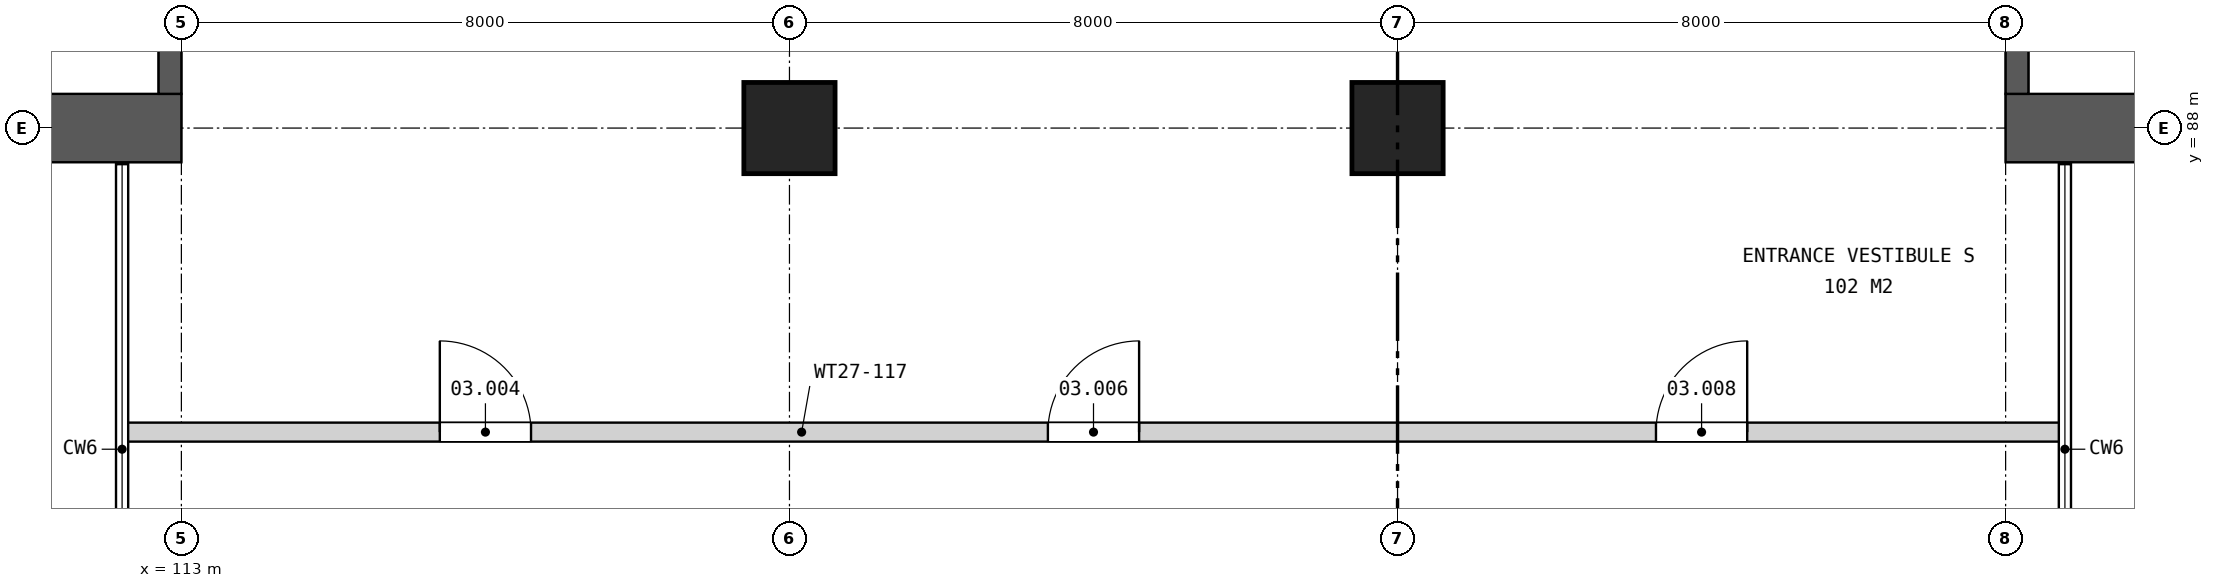
"""IFC4 building model, lengths in metres.
Left out: names, types, materials, properties, quantities, classifications, styles, units other than length and angle.
Written with IfcOpenShell. Run it as: python <this file> out.ifc"""

import sys

from ifc_helpers import new_model, si_unit, direction, frame, frame_2d, origin, origin_2d, place, context, subcontext, project, spatial, rectangle, extrude, element, fill, save


model = new_model("IFC4")
c1 = context("Model", 3, precision=1e-05, world=origin(), true_north=direction((0.0, 1.0)))
c2 = subcontext(c1, "Body", "Model", "MODEL_VIEW")
j1 = project(units=[si_unit("LENGTHUNIT", "METRE"), si_unit("PLANEANGLEUNIT", "RADIAN")], contexts=[c1])
p1 = place(None, origin())
s1 = spatial("IfcSite", under=j1, at=p1, CompositionType="ELEMENT")
p2 = place(p1, origin())
s2 = spatial("IfcBuilding", under=s1, at=p2, CompositionType="ELEMENT")
p3 = place(p2, frame((0.0, 0.0, 25.0)))
s3 = spatial("IfcBuildingStorey", under=s2, at=p3, CompositionType="ELEMENT", Elevation=25.0)
for number, where, z_axis, x_axis in (
    (1, (121.0, 88.0, 0.0), (0.0, 0.0, 1.0), (1.0, 0.0, 0.0)),
    (2, (129.0, 88.0, 0.0), (0.0, 0.0, 1.0), (1.0, 0.0, 0.0)),
):
    element("IfcColumn", number, at=place(p3, frame(where, z_axis=z_axis, x_axis=x_axis)), inside=s3, PredefinedType="COLUMN", context=c2, shape_type="SweptSolid", body=[
        extrude(rectangle(XDim=1.2, YDim=1.2, at=origin_2d()), origin(), (0.0, 0.0, 1.0), 9.0),
    ])
p4 = place(p3, frame((137.0, 88.0, 0.0), z_axis=(0.0, 0.0, 1.0), x_axis=(1.0, 0.0, 0.0)))
e3 = element("IfcWall", 3, at=p4, inside=s3, PredefinedType="SHEAR", context=c2, shape_type="SweptSolid", body=[
    extrude(rectangle(XDim=7.1, YDim=0.9, at=frame_2d((3.55, 0.0))), origin(), (0.0, 0.0, 1.0), 9.0),
])
p5 = place(p3, frame((137.15, 88.45, 0.0), z_axis=(0.0, 0.0, 1.0), x_axis=(0.0, 1.0, 0.0)))
e4 = element("IfcWall", 4, at=p5, inside=s3, PredefinedType="SHEAR", context=c2, shape_type="SweptSolid", body=[
    extrude(rectangle(XDim=5.85, YDim=0.3, at=frame_2d((2.925, 0.0))), origin(), (0.0, 0.0, 1.0), 9.0),
])
p6 = place(p3, frame((113.0, 88.0, 0.0), z_axis=(0.0, 0.0, 1.0), x_axis=(-1.0, 0.0, 0.0)))
e5 = element("IfcWall", 5, at=p6, inside=s3, PredefinedType="SHEAR", context=c2, shape_type="SweptSolid", body=[
    extrude(rectangle(XDim=7.1, YDim=0.9, at=frame_2d((3.55, 0.0))), origin(), (0.0, 0.0, 1.0), 9.0),
])
p7 = place(p3, frame((112.85, 94.3, 0.0), z_axis=(0.0, 0.0, 1.0), x_axis=(0.0, -1.0, 0.0)))
e6 = element("IfcWall", 6, at=p7, inside=s3, PredefinedType="SHEAR", context=c2, shape_type="SweptSolid", body=[
    extrude(rectangle(XDim=5.85, YDim=0.3, at=frame_2d((2.925, 0.0))), origin(), (0.0, 0.0, 1.0), 9.0),
])
p8 = place(p3, frame((112.2, 84.0, 0.0), z_axis=(0.0, 0.0, 1.0), x_axis=(1.0, 0.0, 0.0)))
e7 = element("IfcWall", 7, at=p8, inside=s3, PredefinedType="PARTITIONING", context=c2, shape_type="SweptSolid", body=[
    extrude(rectangle(XDim=25.6, YDim=0.25, at=frame_2d((12.8, 0.0))), origin(), (0.0, 0.0, 1.0), 8.132),
])
p9 = place(p8, frame((4.2, 0.0, 0.0)))
e8 = element("IfcOpeningElement", 8, at=p9, cuts=e7, PredefinedType="OPENING", context=c2, shape_type="SweptSolid", body=[
    extrude(rectangle(XDim=1.2, YDim=2.2, at=frame_2d((0.6, 1.1))), frame((0.0, 0.135, 0.0), z_axis=(0.0, -1.0, 0.0), x_axis=(1.0, 0.0, 0.0)), (0.0, 0.0, 1.0), 0.27),
])
p10 = place(p8, frame((12.2, 0.0, 0.0)))
e9 = element("IfcOpeningElement", 9, at=p10, cuts=e7, PredefinedType="OPENING", context=c2, shape_type="SweptSolid", body=[
    extrude(rectangle(XDim=1.2, YDim=2.2, at=frame_2d((0.6, 1.1))), frame((0.0, 0.135, 0.0), z_axis=(0.0, -1.0, 0.0), x_axis=(1.0, 0.0, 0.0)), (0.0, 0.0, 1.0), 0.27),
])
p11 = place(p8, frame((20.2, 0.0, 0.0)))
e10 = element("IfcOpeningElement", 10, at=p11, cuts=e7, PredefinedType="OPENING", context=c2, shape_type="SweptSolid", body=[
    extrude(rectangle(XDim=1.2, YDim=2.2, at=frame_2d((0.6, 1.1))), frame((0.0, 0.135, 0.0), z_axis=(0.0, -1.0, 0.0), x_axis=(1.0, 0.0, 0.0)), (0.0, 0.0, 1.0), 0.27),
])
p12 = place(p9, origin())
e11 = element("IfcDoor", 11, at=p12, inside=s3, OperationType="SINGLE_SWING_LEFT", PredefinedType="DOOR", context=c2, shape_type="SweptSolid", body=[
    extrude(rectangle(XDim=1.2, YDim=2.2, at=frame_2d((0.6, 1.1))), frame((0.0, 0.025, 0.0), z_axis=(0.0, -1.0, 0.0), x_axis=(1.0, 0.0, 0.0)), (0.0, 0.0, 1.0), 0.05),
])
fill(e8, e11)
p13 = place(p10, origin())
e12 = element("IfcDoor", 12, at=p13, inside=s3, OperationType="SINGLE_SWING_RIGHT", PredefinedType="DOOR", context=c2, shape_type="SweptSolid", body=[
    extrude(rectangle(XDim=1.2, YDim=2.2, at=frame_2d((0.6, 1.1))), frame((0.0, 0.025, 0.0), z_axis=(0.0, -1.0, 0.0), x_axis=(1.0, 0.0, 0.0)), (0.0, 0.0, 1.0), 0.05),
])
fill(e9, e12)
p14 = place(p11, origin())
e13 = element("IfcDoor", 13, at=p14, inside=s3, OperationType="SINGLE_SWING_RIGHT", PredefinedType="DOOR", context=c2, shape_type="SweptSolid", body=[
    extrude(rectangle(XDim=1.2, YDim=2.2, at=frame_2d((0.6, 1.1))), frame((0.0, 0.025, 0.0), z_axis=(0.0, -1.0, 0.0), x_axis=(1.0, 0.0, 0.0)), (0.0, 0.0, 1.0), 0.05),
])
fill(e10, e13)
save(model, sys.argv[1])
